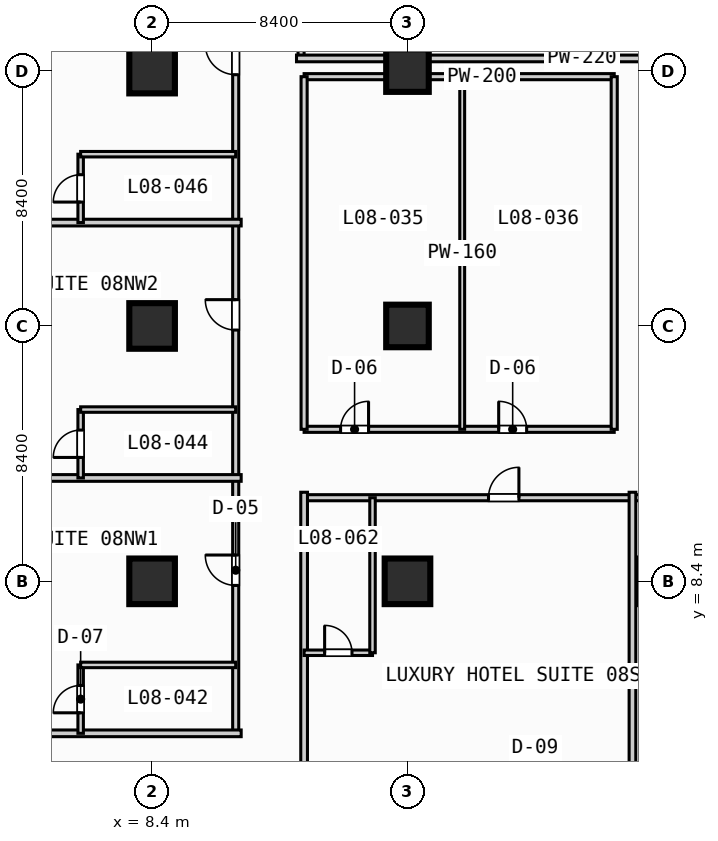
"""IFC4 building model, lengths in metres.
Left out: names, types, materials, properties, quantities, classifications, styles, units other than length and angle.
Written with IfcOpenShell. Run it as: python <this file> out.ifc"""

import sys

from ifc_helpers import new_model, si_unit, direction, frame, frame_2d, origin, origin_2d, place, context, subcontext, project, spatial, rectangle, extrude, element, fill, save


model = new_model("IFC4")
c1 = context("Model", 3, precision=1e-05, world=origin(), true_north=direction((0.0, 1.0)))
c2 = subcontext(c1, "Body", "Model", "MODEL_VIEW")
j1 = project(units=[si_unit("LENGTHUNIT", "METRE"), si_unit("PLANEANGLEUNIT", "RADIAN")], contexts=[c1])
p1 = place(None, origin())
s1 = spatial("IfcSite", under=j1, at=p1, CompositionType="ELEMENT")
p2 = place(p1, origin())
s2 = spatial("IfcBuilding", under=s1, at=p2, CompositionType="ELEMENT")
p3 = place(p2, frame((0.0, 0.0, 39.6)))
s3 = spatial("IfcBuildingStorey", under=s2, at=p3, CompositionType="ELEMENT", Elevation=39.6)
for number, where, z_axis, x_axis in (
    (1, (8.4, 8.4, 0.0), (0.0, 0.0, 1.0), (1.0, 0.0, 0.0)),
    (2, (8.4, 16.8, 0.0), (0.0, 0.0, 1.0), (1.0, 0.0, 0.0)),
    (3, (8.4, 25.2, 0.0), (0.0, 0.0, 1.0), (1.0, 0.0, 0.0)),
    (4, (16.8, 8.4, 0.0), (0.0, 0.0, 1.0), (1.0, 0.0, 0.0)),
):
    element("IfcColumn", number, at=place(p3, frame(where, z_axis=z_axis, x_axis=x_axis)), inside=s3, PredefinedType="COLUMN", context=c2, shape_type="SweptSolid", body=[
        extrude(rectangle(XDim=1.5, YDim=1.5, at=origin_2d()), origin(), (0.0, 0.0, 1.0), 3.8),
    ])
for number, where, z_axis, x_axis in (
    (5, (16.8, 16.8, 0.0), (0.0, 0.0, 1.0), (1.0, 0.0, 0.0)),
    (6, (16.8, 25.2, 0.0), (0.0, 0.0, 1.0), (1.0, 0.0, 0.0)),
):
    element("IfcColumn", number, at=place(p3, frame(where, z_axis=z_axis, x_axis=x_axis)), inside=s3, PredefinedType="COLUMN", context=c2, shape_type="SweptSolid", body=[
        extrude(rectangle(XDim=1.4, YDim=1.4, at=origin_2d()), origin(), (0.0, 0.0, 1.0), 3.8),
    ])
p4 = place(p3, frame((13.4, 13.4, 0.0), z_axis=(0.0, 0.0, 1.0), x_axis=(1.0, 0.0, 0.0)))
e7 = element("IfcWall", 7, at=p4, inside=s3, PredefinedType="PARTITIONING", context=c2, shape_type="SweptSolid", body=[
    extrude(rectangle(XDim=10.2, YDim=0.2, at=frame_2d((5.1, 0.0))), origin(), (0.0, 0.0, 1.0), 3.55),
])
p5 = place(p4, frame((1.2, 0.0, 0.0)))
e8 = element("IfcOpeningElement", 8, at=p5, cuts=e7, PredefinedType="OPENING", context=c2, shape_type="SweptSolid", body=[
    extrude(rectangle(XDim=0.92, YDim=2.1, at=frame_2d((0.46, 1.05))), frame((0.0, 0.11, 0.0), z_axis=(0.0, -1.0, 0.0), x_axis=(1.0, 0.0, 0.0)), (0.0, 0.0, 1.0), 0.22),
])
p6 = place(p4, frame((6.4, 0.0, 0.0)))
e9 = element("IfcOpeningElement", 9, at=p6, cuts=e7, PredefinedType="OPENING", context=c2, shape_type="SweptSolid", body=[
    extrude(rectangle(XDim=0.92, YDim=2.1, at=frame_2d((0.46, 1.05))), frame((0.0, 0.11, 0.0), z_axis=(0.0, -1.0, 0.0), x_axis=(1.0, 0.0, 0.0)), (0.0, 0.0, 1.0), 0.22),
])
p7 = place(p3, frame((18.6, 13.4, 0.0), z_axis=(0.0, 0.0, 1.0), x_axis=(0.0, 1.0, 0.0)))
e10 = element("IfcWall", 10, at=p7, inside=s3, PredefinedType="PARTITIONING", context=c2, shape_type="SweptSolid", body=[
    extrude(rectangle(XDim=11.6, YDim=0.16, at=frame_2d((5.8, 0.0))), origin(), (0.0, 0.0, 1.0), 3.55),
])
p8 = place(p3, frame((13.4, 25.0, 0.0), z_axis=(0.0, 0.0, 1.0), x_axis=(1.0, 0.0, 0.0)))
e11 = element("IfcWall", 11, at=p8, inside=s3, PredefinedType="PARTITIONING", context=c2, shape_type="SweptSolid", body=[
    extrude(rectangle(XDim=10.2, YDim=0.2, at=frame_2d((5.1, 0.0))), origin(), (0.0, 0.0, 1.0), 2.8),
])
for number, where, z_axis, x_axis in (
    (12, (13.4, 13.4, 0.0), (0.0, 0.0, 1.0), (0.0, 1.0, 0.0)),
    (13, (23.6, 13.4, 0.0), (0.0, 0.0, 1.0), (0.0, 1.0, 0.0)),
):
    element("IfcWall", number, at=place(p3, frame(where, z_axis=z_axis, x_axis=x_axis)), inside=s3, PredefinedType="PARTITIONING", context=c2, shape_type="SweptSolid", body=[
        extrude(rectangle(XDim=11.6, YDim=0.2, at=frame_2d((5.8, 0.0))), origin(), (0.0, 0.0, 1.0), 3.55),
    ])
p9 = place(p3, frame((13.3, 25.6, 0.0), z_axis=(0.0, 0.0, 1.0), x_axis=(0.0, 1.0, 0.0)))
e14 = element("IfcWall", 14, at=p9, inside=s3, PredefinedType="PARTITIONING", context=c2, shape_type="SweptSolid", body=[
    extrude(rectangle(XDim=13.6, YDim=0.2, at=frame_2d((6.8, 0.0))), origin(), (0.0, 0.0, 1.0), 3.55),
])
p10 = place(p9, frame((1.735, 0.0, 0.0)))
e15 = element("IfcOpeningElement", 15, at=p10, cuts=e14, PredefinedType="OPENING", context=c2, shape_type="SweptSolid", body=[
    extrude(rectangle(XDim=1.0, YDim=2.15, at=frame_2d((0.5, 1.075))), frame((0.0, 0.11, 0.0), z_axis=(0.0, -1.0, 0.0), x_axis=(1.0, 0.0, 0.0)), (0.0, 0.0, 1.0), 0.22),
])
p11 = place(p9, frame((8.535, 0.0, 0.0)))
e16 = element("IfcOpeningElement", 16, at=p11, cuts=e14, PredefinedType="OPENING", context=c2, shape_type="SweptSolid", body=[
    extrude(rectangle(XDim=1.0, YDim=2.15, at=frame_2d((0.5, 1.075))), frame((0.0, 0.11, 0.0), z_axis=(0.0, -1.0, 0.0), x_axis=(1.0, 0.0, 0.0)), (0.0, 0.0, 1.0), 0.22),
])
p12 = place(p3, frame((13.15, 25.6, 0.0), z_axis=(0.0, 0.0, 1.0), x_axis=(1.0, 0.0, 0.0)))
e17 = element("IfcWall", 17, at=p12, inside=s3, PredefinedType="PARTITIONING", context=c2, shape_type="SweptSolid", body=[
    extrude(rectangle(XDim=20.28, YDim=0.22, at=frame_2d((10.14, 0.0))), origin(), (0.0, 0.0, 1.0), 3.55),
])
p13 = place(p3, frame((11.15, 3.4, 0.0), z_axis=(0.0, 0.0, 1.0), x_axis=(0.0, 1.0, 0.0)))
e18 = element("IfcWall", 18, at=p13, inside=s3, PredefinedType="PARTITIONING", context=c2, shape_type="SweptSolid", body=[
    extrude(rectangle(XDim=85.4, YDim=0.2, at=frame_2d((42.7, 0.0))), origin(), (0.0, 0.0, 1.0), 3.55),
])
p14 = place(p13, frame((4.865, 0.0, 0.0)))
e19 = element("IfcOpeningElement", 19, at=p14, cuts=e18, PredefinedType="OPENING", context=c2, shape_type="SweptSolid", body=[
    extrude(rectangle(XDim=1.0, YDim=2.15, at=frame_2d((0.5, 1.075))), frame((0.0, 0.11, 0.0), z_axis=(0.0, -1.0, 0.0), x_axis=(1.0, 0.0, 0.0)), (0.0, 0.0, 1.0), 0.22),
])
p15 = place(p13, frame((13.265, 0.0, 0.0)))
e20 = element("IfcOpeningElement", 20, at=p15, cuts=e18, PredefinedType="OPENING", context=c2, shape_type="SweptSolid", body=[
    extrude(rectangle(XDim=1.0, YDim=2.15, at=frame_2d((0.5, 1.075))), frame((0.0, 0.11, 0.0), z_axis=(0.0, -1.0, 0.0), x_axis=(1.0, 0.0, 0.0)), (0.0, 0.0, 1.0), 0.22),
])
p16 = place(p13, frame((21.665, 0.0, 0.0)))
e21 = element("IfcOpeningElement", 21, at=p16, cuts=e18, PredefinedType="OPENING", context=c2, shape_type="SweptSolid", body=[
    extrude(rectangle(XDim=1.0, YDim=2.15, at=frame_2d((0.5, 1.075))), frame((0.0, 0.11, 0.0), z_axis=(0.0, -1.0, 0.0), x_axis=(1.0, 0.0, 0.0)), (0.0, 0.0, 1.0), 0.22),
])
p17 = place(p13, frame((30.065, 0.0, 0.0)))
e22 = element("IfcOpeningElement", 22, at=p17, cuts=e18, PredefinedType="OPENING", context=c2, shape_type="SweptSolid", body=[
    extrude(rectangle(XDim=1.0, YDim=2.15, at=frame_2d((0.5, 1.075))), frame((0.0, 0.11, 0.0), z_axis=(0.0, -1.0, 0.0), x_axis=(1.0, 0.0, 0.0)), (0.0, 0.0, 1.0), 0.22),
])
p18 = place(p13, frame((38.465, 0.0, 0.0)))
e23 = element("IfcOpeningElement", 23, at=p18, cuts=e18, PredefinedType="OPENING", context=c2, shape_type="SweptSolid", body=[
    extrude(rectangle(XDim=1.0, YDim=2.15, at=frame_2d((0.5, 1.075))), frame((0.0, 0.11, 0.0), z_axis=(0.0, -1.0, 0.0), x_axis=(1.0, 0.0, 0.0)), (0.0, 0.0, 1.0), 0.22),
])
p19 = place(p13, frame((46.865, 0.0, 0.0)))
e24 = element("IfcOpeningElement", 24, at=p19, cuts=e18, PredefinedType="OPENING", context=c2, shape_type="SweptSolid", body=[
    extrude(rectangle(XDim=1.0, YDim=2.15, at=frame_2d((0.5, 1.075))), frame((0.0, 0.11, 0.0), z_axis=(0.0, -1.0, 0.0), x_axis=(1.0, 0.0, 0.0)), (0.0, 0.0, 1.0), 0.22),
])
p20 = place(p13, frame((55.265, 0.0, 0.0)))
e25 = element("IfcOpeningElement", 25, at=p20, cuts=e18, PredefinedType="OPENING", context=c2, shape_type="SweptSolid", body=[
    extrude(rectangle(XDim=1.0, YDim=2.15, at=frame_2d((0.5, 1.075))), frame((0.0, 0.11, 0.0), z_axis=(0.0, -1.0, 0.0), x_axis=(1.0, 0.0, 0.0)), (0.0, 0.0, 1.0), 0.22),
])
p21 = place(p13, frame((63.665, 0.0, 0.0)))
e26 = element("IfcOpeningElement", 26, at=p21, cuts=e18, PredefinedType="OPENING", context=c2, shape_type="SweptSolid", body=[
    extrude(rectangle(XDim=1.0, YDim=2.15, at=frame_2d((0.5, 1.075))), frame((0.0, 0.11, 0.0), z_axis=(0.0, -1.0, 0.0), x_axis=(1.0, 0.0, 0.0)), (0.0, 0.0, 1.0), 0.22),
])
p22 = place(p13, frame((72.065, 0.0, 0.0)))
e27 = element("IfcOpeningElement", 27, at=p22, cuts=e18, PredefinedType="OPENING", context=c2, shape_type="SweptSolid", body=[
    extrude(rectangle(XDim=1.0, YDim=2.15, at=frame_2d((0.5, 1.075))), frame((0.0, 0.11, 0.0), z_axis=(0.0, -1.0, 0.0), x_axis=(1.0, 0.0, 0.0)), (0.0, 0.0, 1.0), 0.22),
])
p23 = place(p13, frame((81.165, 0.0, 0.0)))
e28 = element("IfcOpeningElement", 28, at=p23, cuts=e18, PredefinedType="OPENING", context=c2, shape_type="SweptSolid", body=[
    extrude(rectangle(XDim=1.0, YDim=2.15, at=frame_2d((0.5, 1.075))), frame((0.0, 0.11, 0.0), z_axis=(0.0, -1.0, 0.0), x_axis=(1.0, 0.0, 0.0)), (0.0, 0.0, 1.0), 0.22),
])
p24 = place(p3, frame((0.2, 3.4, 0.0), z_axis=(0.0, 0.0, 1.0), x_axis=(1.0, 0.0, 0.0)))
e29 = element("IfcWall", 29, at=p24, inside=s3, PredefinedType="PARTITIONING", context=c2, shape_type="SweptSolid", body=[
    extrude(rectangle(XDim=11.13, YDim=0.22, at=frame_2d((5.565, 0.0))), origin(), (0.0, 0.0, 1.0), 3.55),
])
p25 = place(p3, frame((6.05, 3.4, 0.0), z_axis=(0.0, 0.0, 1.0), x_axis=(0.0, 1.0, 0.0)))
e30 = element("IfcWall", 30, at=p25, inside=s3, PredefinedType="PLUMBINGWALL", context=c2, shape_type="SweptSolid", body=[
    extrude(rectangle(XDim=2.25, YDim=0.18, at=frame_2d((1.125, 0.0))), origin(), (0.0, 0.0, 1.0), 3.55),
])
p26 = place(p25, frame((0.675, 0.0, 0.0)))
e31 = element("IfcOpeningElement", 31, at=p26, cuts=e30, PredefinedType="OPENING", context=c2, shape_type="SweptSolid", body=[
    extrude(rectangle(XDim=0.9, YDim=2.1, at=frame_2d((0.45, 1.05))), frame((0.0, 0.1, 0.0), z_axis=(0.0, -1.0, 0.0), x_axis=(1.0, 0.0, 0.0)), (0.0, 0.0, 1.0), 0.2),
])
p27 = place(p3, frame((6.05, 5.65, 0.0), z_axis=(0.0, 0.0, 1.0), x_axis=(1.0, 0.0, 0.0)))
e32 = element("IfcWall", 32, at=p27, inside=s3, PredefinedType="PLUMBINGWALL", context=c2, shape_type="SweptSolid", body=[
    extrude(rectangle(XDim=5.1, YDim=0.18, at=frame_2d((2.55, 0.0))), origin(), (0.0, 0.0, 1.0), 3.55),
])
p28 = place(p3, frame((0.2, 11.8, 0.0), z_axis=(0.0, 0.0, 1.0), x_axis=(1.0, 0.0, 0.0)))
e33 = element("IfcWall", 33, at=p28, inside=s3, PredefinedType="PARTITIONING", context=c2, shape_type="SweptSolid", body=[
    extrude(rectangle(XDim=11.13, YDim=0.22, at=frame_2d((5.565, 0.0))), origin(), (0.0, 0.0, 1.0), 3.55),
])
p29 = place(p3, frame((6.05, 11.8, 0.0), z_axis=(0.0, 0.0, 1.0), x_axis=(0.0, 1.0, 0.0)))
e34 = element("IfcWall", 34, at=p29, inside=s3, PredefinedType="PLUMBINGWALL", context=c2, shape_type="SweptSolid", body=[
    extrude(rectangle(XDim=2.25, YDim=0.18, at=frame_2d((1.125, 0.0))), origin(), (0.0, 0.0, 1.0), 3.55),
])
p30 = place(p29, frame((0.675, 0.0, 0.0)))
e35 = element("IfcOpeningElement", 35, at=p30, cuts=e34, PredefinedType="OPENING", context=c2, shape_type="SweptSolid", body=[
    extrude(rectangle(XDim=0.9, YDim=2.1, at=frame_2d((0.45, 1.05))), frame((0.0, 0.1, 0.0), z_axis=(0.0, -1.0, 0.0), x_axis=(1.0, 0.0, 0.0)), (0.0, 0.0, 1.0), 0.2),
])
p31 = place(p3, frame((6.05, 14.05, 0.0), z_axis=(0.0, 0.0, 1.0), x_axis=(1.0, 0.0, 0.0)))
e36 = element("IfcWall", 36, at=p31, inside=s3, PredefinedType="PLUMBINGWALL", context=c2, shape_type="SweptSolid", body=[
    extrude(rectangle(XDim=5.1, YDim=0.18, at=frame_2d((2.55, 0.0))), origin(), (0.0, 0.0, 1.0), 3.55),
])
p32 = place(p3, frame((0.2, 20.2, 0.0), z_axis=(0.0, 0.0, 1.0), x_axis=(1.0, 0.0, 0.0)))
e37 = element("IfcWall", 37, at=p32, inside=s3, PredefinedType="PARTITIONING", context=c2, shape_type="SweptSolid", body=[
    extrude(rectangle(XDim=11.13, YDim=0.22, at=frame_2d((5.565, 0.0))), origin(), (0.0, 0.0, 1.0), 3.55),
])
p33 = place(p3, frame((6.05, 20.2, 0.0), z_axis=(0.0, 0.0, 1.0), x_axis=(0.0, 1.0, 0.0)))
e38 = element("IfcWall", 38, at=p33, inside=s3, PredefinedType="PLUMBINGWALL", context=c2, shape_type="SweptSolid", body=[
    extrude(rectangle(XDim=2.25, YDim=0.18, at=frame_2d((1.125, 0.0))), origin(), (0.0, 0.0, 1.0), 3.55),
])
p34 = place(p33, frame((0.675, 0.0, 0.0)))
e39 = element("IfcOpeningElement", 39, at=p34, cuts=e38, PredefinedType="OPENING", context=c2, shape_type="SweptSolid", body=[
    extrude(rectangle(XDim=0.9, YDim=2.1, at=frame_2d((0.45, 1.05))), frame((0.0, 0.1, 0.0), z_axis=(0.0, -1.0, 0.0), x_axis=(1.0, 0.0, 0.0)), (0.0, 0.0, 1.0), 0.2),
])
p35 = place(p3, frame((6.05, 22.45, 0.0), z_axis=(0.0, 0.0, 1.0), x_axis=(1.0, 0.0, 0.0)))
e40 = element("IfcWall", 40, at=p35, inside=s3, PredefinedType="PLUMBINGWALL", context=c2, shape_type="SweptSolid", body=[
    extrude(rectangle(XDim=5.1, YDim=0.18, at=frame_2d((2.55, 0.0))), origin(), (0.0, 0.0, 1.0), 3.55),
])
p36 = place(p3, frame((13.4, 11.15, 0.0), z_axis=(0.0, 0.0, 1.0), x_axis=(1.0, 0.0, 0.0)))
e41 = element("IfcWall", 41, at=p36, inside=s3, PredefinedType="PARTITIONING", context=c2, shape_type="SweptSolid", body=[
    extrude(rectangle(XDim=75.4, YDim=0.2, at=frame_2d((37.7, 0.0))), origin(), (0.0, 0.0, 1.0), 3.55),
])
p37 = place(p36, frame((6.065, 0.0, 0.0)))
e42 = element("IfcOpeningElement", 42, at=p37, cuts=e41, PredefinedType="OPENING", context=c2, shape_type="SweptSolid", body=[
    extrude(rectangle(XDim=1.0, YDim=2.15, at=frame_2d((0.5, 1.075))), frame((0.0, 0.11, 0.0), z_axis=(0.0, -1.0, 0.0), x_axis=(1.0, 0.0, 0.0)), (0.0, 0.0, 1.0), 0.22),
])
p38 = place(p36, frame((13.36, 0.0, 0.0)))
e43 = element("IfcOpeningElement", 43, at=p38, cuts=e41, PredefinedType="OPENING", context=c2, shape_type="SweptSolid", body=[
    extrude(rectangle(XDim=1.0, YDim=2.15, at=frame_2d((0.5, 1.075))), frame((0.0, 0.11, 0.0), z_axis=(0.0, -1.0, 0.0), x_axis=(1.0, 0.0, 0.0)), (0.0, 0.0, 1.0), 0.22),
])
p39 = place(p36, frame((21.785, 0.0, 0.0)))
e44 = element("IfcOpeningElement", 44, at=p39, cuts=e41, PredefinedType="OPENING", context=c2, shape_type="SweptSolid", body=[
    extrude(rectangle(XDim=1.0, YDim=2.15, at=frame_2d((0.5, 1.075))), frame((0.0, 0.11, 0.0), z_axis=(0.0, -1.0, 0.0), x_axis=(1.0, 0.0, 0.0)), (0.0, 0.0, 1.0), 0.22),
])
p40 = place(p36, frame((30.185, 0.0, 0.0)))
e45 = element("IfcOpeningElement", 45, at=p40, cuts=e41, PredefinedType="OPENING", context=c2, shape_type="SweptSolid", body=[
    extrude(rectangle(XDim=1.0, YDim=2.15, at=frame_2d((0.5, 1.075))), frame((0.0, 0.11, 0.0), z_axis=(0.0, -1.0, 0.0), x_axis=(1.0, 0.0, 0.0)), (0.0, 0.0, 1.0), 0.22),
])
p41 = place(p36, frame((41.76, 0.0, 0.0)))
e46 = element("IfcOpeningElement", 46, at=p41, cuts=e41, PredefinedType="OPENING", context=c2, shape_type="SweptSolid", body=[
    extrude(rectangle(XDim=1.0, YDim=2.15, at=frame_2d((0.5, 1.075))), frame((0.0, 0.11, 0.0), z_axis=(0.0, -1.0, 0.0), x_axis=(1.0, 0.0, 0.0)), (0.0, 0.0, 1.0), 0.22),
])
p42 = place(p36, frame((54.36, 0.0, 0.0)))
e47 = element("IfcOpeningElement", 47, at=p42, cuts=e41, PredefinedType="OPENING", context=c2, shape_type="SweptSolid", body=[
    extrude(rectangle(XDim=1.0, YDim=2.15, at=frame_2d((0.5, 1.075))), frame((0.0, 0.11, 0.0), z_axis=(0.0, -1.0, 0.0), x_axis=(1.0, 0.0, 0.0)), (0.0, 0.0, 1.0), 0.22),
])
p43 = place(p36, frame((63.785, 0.0, 0.0)))
e48 = element("IfcOpeningElement", 48, at=p43, cuts=e41, PredefinedType="OPENING", context=c2, shape_type="SweptSolid", body=[
    extrude(rectangle(XDim=1.0, YDim=2.15, at=frame_2d((0.5, 1.075))), frame((0.0, 0.11, 0.0), z_axis=(0.0, -1.0, 0.0), x_axis=(1.0, 0.0, 0.0)), (0.0, 0.0, 1.0), 0.22),
])
p44 = place(p36, frame((70.86, 0.0, 0.0)))
e49 = element("IfcOpeningElement", 49, at=p44, cuts=e41, PredefinedType="OPENING", context=c2, shape_type="SweptSolid", body=[
    extrude(rectangle(XDim=1.0, YDim=2.15, at=frame_2d((0.5, 1.075))), frame((0.0, 0.11, 0.0), z_axis=(0.0, -1.0, 0.0), x_axis=(1.0, 0.0, 0.0)), (0.0, 0.0, 1.0), 0.22),
])
p45 = place(p3, frame((13.4, 0.2, 0.0), z_axis=(0.0, 0.0, 1.0), x_axis=(0.0, 1.0, 0.0)))
e50 = element("IfcWall", 50, at=p45, inside=s3, PredefinedType="PARTITIONING", context=c2, shape_type="SweptSolid", body=[
    extrude(rectangle(XDim=11.13, YDim=0.22, at=frame_2d((5.565, 0.0))), origin(), (0.0, 0.0, 1.0), 3.55),
])
p46 = place(p3, frame((13.4, 6.05, 0.0), z_axis=(0.0, 0.0, 1.0), x_axis=(1.0, 0.0, 0.0)))
e51 = element("IfcWall", 51, at=p46, inside=s3, PredefinedType="PLUMBINGWALL", context=c2, shape_type="SweptSolid", body=[
    extrude(rectangle(XDim=2.25, YDim=0.18, at=frame_2d((1.125, 0.0))), origin(), (0.0, 0.0, 1.0), 3.55),
])
p47 = place(p46, frame((0.675, 0.0, 0.0)))
e52 = element("IfcOpeningElement", 52, at=p47, cuts=e51, PredefinedType="OPENING", context=c2, shape_type="SweptSolid", body=[
    extrude(rectangle(XDim=0.9, YDim=2.1, at=frame_2d((0.45, 1.05))), frame((0.0, 0.1, 0.0), z_axis=(0.0, -1.0, 0.0), x_axis=(1.0, 0.0, 0.0)), (0.0, 0.0, 1.0), 0.2),
])
p48 = place(p3, frame((15.65, 6.05, 0.0), z_axis=(0.0, 0.0, 1.0), x_axis=(0.0, 1.0, 0.0)))
e53 = element("IfcWall", 53, at=p48, inside=s3, PredefinedType="PLUMBINGWALL", context=c2, shape_type="SweptSolid", body=[
    extrude(rectangle(XDim=5.1, YDim=0.18, at=frame_2d((2.55, 0.0))), origin(), (0.0, 0.0, 1.0), 3.55),
])
p49 = place(p3, frame((24.2, 0.2, 0.0), z_axis=(0.0, 0.0, 1.0), x_axis=(0.0, 1.0, 0.0)))
e54 = element("IfcWall", 54, at=p49, inside=s3, PredefinedType="PARTITIONING", context=c2, shape_type="SweptSolid", body=[
    extrude(rectangle(XDim=11.13, YDim=0.22, at=frame_2d((5.565, 0.0))), origin(), (0.0, 0.0, 1.0), 3.55),
])
p50 = place(p5, origin())
e55 = element("IfcDoor", 55, at=p50, inside=s3, OperationType="SINGLE_SWING_RIGHT", PredefinedType="DOOR", context=c2, shape_type="SweptSolid", body=[
    extrude(rectangle(XDim=0.92, YDim=2.1, at=frame_2d((0.46, 1.05))), frame((0.0, 0.025, 0.0), z_axis=(0.0, -1.0, 0.0), x_axis=(1.0, 0.0, 0.0)), (0.0, 0.0, 1.0), 0.05),
])
fill(e8, e55)
p51 = place(p6, origin())
e56 = element("IfcDoor", 56, at=p51, inside=s3, OperationType="SINGLE_SWING_LEFT", PredefinedType="DOOR", context=c2, shape_type="SweptSolid", body=[
    extrude(rectangle(XDim=0.92, YDim=2.1, at=frame_2d((0.46, 1.05))), frame((0.0, 0.025, 0.0), z_axis=(0.0, -1.0, 0.0), x_axis=(1.0, 0.0, 0.0)), (0.0, 0.0, 1.0), 0.05),
])
fill(e9, e56)
p52 = place(p14, origin())
e57 = element("IfcDoor", 57, at=p52, inside=s3, OperationType="SINGLE_SWING_RIGHT", PredefinedType="DOOR", context=c2, shape_type="SweptSolid", body=[
    extrude(rectangle(XDim=1.0, YDim=2.15, at=frame_2d((0.5, 1.075))), frame((0.0, 0.025, 0.0), z_axis=(0.0, -1.0, 0.0), x_axis=(1.0, 0.0, 0.0)), (0.0, 0.0, 1.0), 0.05),
])
fill(e19, e57)
p53 = place(p15, origin())
e58 = element("IfcDoor", 58, at=p53, inside=s3, OperationType="SINGLE_SWING_RIGHT", PredefinedType="DOOR", context=c2, shape_type="SweptSolid", body=[
    extrude(rectangle(XDim=1.0, YDim=2.15, at=frame_2d((0.5, 1.075))), frame((0.0, 0.025, 0.0), z_axis=(0.0, -1.0, 0.0), x_axis=(1.0, 0.0, 0.0)), (0.0, 0.0, 1.0), 0.05),
])
fill(e20, e58)
p54 = place(p16, origin())
e59 = element("IfcDoor", 59, at=p54, inside=s3, OperationType="SINGLE_SWING_RIGHT", PredefinedType="DOOR", context=c2, shape_type="SweptSolid", body=[
    extrude(rectangle(XDim=1.0, YDim=2.15, at=frame_2d((0.5, 1.075))), frame((0.0, 0.025, 0.0), z_axis=(0.0, -1.0, 0.0), x_axis=(1.0, 0.0, 0.0)), (0.0, 0.0, 1.0), 0.05),
])
fill(e21, e59)
p55 = place(p26, origin())
e60 = element("IfcDoor", 60, at=p55, inside=s3, OperationType="SINGLE_SWING_LEFT", PredefinedType="DOOR", context=c2, shape_type="SweptSolid", body=[
    extrude(rectangle(XDim=0.9, YDim=2.1, at=frame_2d((0.45, 1.05))), frame((0.0, 0.025, 0.0), z_axis=(0.0, -1.0, 0.0), x_axis=(1.0, 0.0, 0.0)), (0.0, 0.0, 1.0), 0.05),
])
fill(e31, e60)
p56 = place(p30, origin())
e61 = element("IfcDoor", 61, at=p56, inside=s3, OperationType="SINGLE_SWING_LEFT", PredefinedType="DOOR", context=c2, shape_type="SweptSolid", body=[
    extrude(rectangle(XDim=0.9, YDim=2.1, at=frame_2d((0.45, 1.05))), frame((0.0, 0.025, 0.0), z_axis=(0.0, -1.0, 0.0), x_axis=(1.0, 0.0, 0.0)), (0.0, 0.0, 1.0), 0.05),
])
fill(e35, e61)
p57 = place(p34, origin())
e62 = element("IfcDoor", 62, at=p57, inside=s3, OperationType="SINGLE_SWING_LEFT", PredefinedType="DOOR", context=c2, shape_type="SweptSolid", body=[
    extrude(rectangle(XDim=0.9, YDim=2.1, at=frame_2d((0.45, 1.05))), frame((0.0, 0.025, 0.0), z_axis=(0.0, -1.0, 0.0), x_axis=(1.0, 0.0, 0.0)), (0.0, 0.0, 1.0), 0.05),
])
fill(e39, e62)
p58 = place(p37, origin())
e63 = element("IfcDoor", 63, at=p58, inside=s3, OperationType="SINGLE_SWING_RIGHT", PredefinedType="DOOR", context=c2, shape_type="SweptSolid", body=[
    extrude(rectangle(XDim=1.0, YDim=2.15, at=frame_2d((0.5, 1.075))), frame((0.0, 0.025, 0.0), z_axis=(0.0, -1.0, 0.0), x_axis=(1.0, 0.0, 0.0)), (0.0, 0.0, 1.0), 0.05),
])
fill(e42, e63)
p59 = place(p47, origin())
e64 = element("IfcDoor", 64, at=p59, inside=s3, OperationType="SINGLE_SWING_LEFT", PredefinedType="DOOR", context=c2, shape_type="SweptSolid", body=[
    extrude(rectangle(XDim=0.9, YDim=2.1, at=frame_2d((0.45, 1.05))), frame((0.0, 0.025, 0.0), z_axis=(0.0, -1.0, 0.0), x_axis=(1.0, 0.0, 0.0)), (0.0, 0.0, 1.0), 0.05),
])
fill(e52, e64)
save(model, sys.argv[1])
